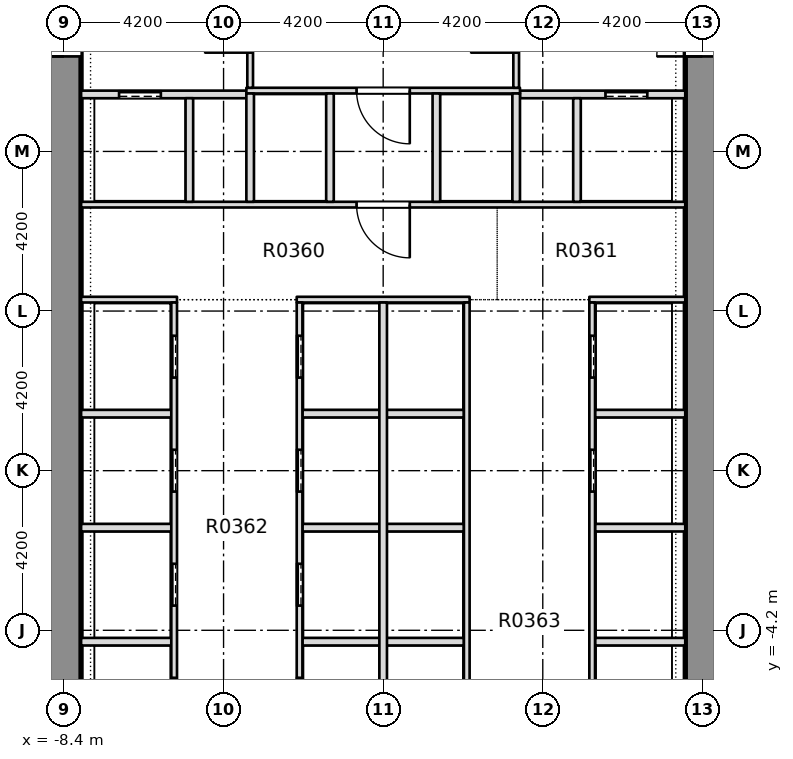
"""IFC4 building model, lengths in metres.
Left out: names, types, materials, properties, quantities, classifications, styles, units other than length and angle.
Written with IfcOpenShell. Run it as: python <this file> out.ifc"""

import sys

from ifc_helpers import new_model, si_unit, direction, frame, frame_2d, origin, place, context, subcontext, project, spatial, rectangle, extrude, element, fill, save


model = new_model("IFC4")
c1 = context("Model", 3, precision=1e-05, world=origin(), true_north=direction((0.0, 1.0)))
c2 = subcontext(c1, "Body", "Model", "MODEL_VIEW")
j1 = project(units=[si_unit("LENGTHUNIT", "METRE"), si_unit("PLANEANGLEUNIT", "RADIAN")], contexts=[c1])
p1 = place(None, origin())
s1 = spatial("IfcSite", under=j1, at=p1, CompositionType="ELEMENT")
p2 = place(p1, origin())
s2 = spatial("IfcBuilding", under=s1, at=p2, CompositionType="ELEMENT")
p3 = place(p2, frame((0.0, 0.0, 20.0)))
s3 = spatial("IfcBuildingStorey", under=s2, at=p3, CompositionType="ELEMENT", Elevation=20.0)
p4 = place(p3, frame((-8.4, -7.5, -0.4), z_axis=(0.0, 0.0, 1.0), x_axis=(0.0, 1.0, 0.0)))
e1 = element("IfcWall", 1, at=p4, inside=s3, PredefinedType="SHEAR", context=c2, shape_type="SweptSolid", body=[
    extrude(rectangle(XDim=28.35, YDim=0.9, at=frame_2d((14.175, 0.0))), origin(), (0.0, 0.0, 1.0), 5.0),
])
p5 = place(p4, frame((18.4, 0.0, 0.4)))
e2 = element("IfcOpeningElement", 2, at=p5, cuts=e1, PredefinedType="OPENING", context=c2, shape_type="SweptSolid", body=[
    extrude(rectangle(XDim=1.2, YDim=2.1, at=frame_2d((0.6, 1.05))), frame((0.0, 0.46, 0.0), z_axis=(0.0, -1.0, 0.0), x_axis=(1.0, 0.0, 0.0)), (0.0, 0.0, 1.0), 0.92),
])
p6 = place(p3, frame((8.4, -7.5, -0.4), z_axis=(0.0, 0.0, 1.0), x_axis=(0.0, 1.0, 0.0)))
e3 = element("IfcWall", 3, at=p6, inside=s3, PredefinedType="SHEAR", context=c2, shape_type="SweptSolid", body=[
    extrude(rectangle(XDim=28.35, YDim=0.9, at=frame_2d((14.175, 0.0))), origin(), (0.0, 0.0, 1.0), 5.0),
])
p7 = place(p6, frame((18.4, 0.0, 0.4)))
e4 = element("IfcOpeningElement", 4, at=p7, cuts=e3, PredefinedType="OPENING", context=c2, shape_type="SweptSolid", body=[
    extrude(rectangle(XDim=1.2, YDim=2.1, at=frame_2d((0.6, 1.05))), frame((0.0, 0.46, 0.0), z_axis=(0.0, -1.0, 0.0), x_axis=(1.0, 0.0, 0.0)), (0.0, 0.0, 1.0), 0.92),
])
p8 = place(p3, frame((-7.949, -4.5, 0.0), z_axis=(0.0, 0.0, 1.0), x_axis=(1.0, 0.0, 0.0)))
e5 = element("IfcWall", 5, at=p8, inside=s3, PredefinedType="PARTITIONING", context=c2, shape_type="SweptSolid", body=[
    extrude(rectangle(XDim=2.374, YDim=0.2, at=frame_2d((1.187, 0.0))), origin(), (0.0, 0.0, 1.0), 4.6),
])
p9 = place(p3, frame((-2.125, -4.5, 0.0), z_axis=(0.0, 0.0, 1.0), x_axis=(1.0, 0.0, 0.0)))
e6 = element("IfcWall", 6, at=p9, inside=s3, PredefinedType="PARTITIONING", context=c2, shape_type="SweptSolid", body=[
    extrude(rectangle(XDim=4.25, YDim=0.2, at=frame_2d((2.125, 0.0))), origin(), (0.0, 0.0, 1.0), 4.6),
])
for number, where, z_axis, x_axis in (
    (7, (5.575, -4.5, 0.0), (0.0, 0.0, 1.0), (1.0, 0.0, 0.0)),
    (8, (-7.949, -1.5, 0.0), (0.0, 0.0, 1.0), (1.0, 0.0, 0.0)),
):
    element("IfcWall", number, at=place(p3, frame(where, z_axis=z_axis, x_axis=x_axis)), inside=s3, PredefinedType="PARTITIONING", context=c2, shape_type="SweptSolid", body=[
        extrude(rectangle(XDim=2.374, YDim=0.2, at=frame_2d((1.187, 0.0))), origin(), (0.0, 0.0, 1.0), 4.6),
    ])
p10 = place(p3, frame((-2.125, -1.5, 0.0), z_axis=(0.0, 0.0, 1.0), x_axis=(1.0, 0.0, 0.0)))
e9 = element("IfcWall", 9, at=p10, inside=s3, PredefinedType="PARTITIONING", context=c2, shape_type="SweptSolid", body=[
    extrude(rectangle(XDim=4.25, YDim=0.2, at=frame_2d((2.125, 0.0))), origin(), (0.0, 0.0, 1.0), 4.6),
])
for number, where, z_axis, x_axis in (
    (10, (5.575, -1.5, 0.0), (0.0, 0.0, 1.0), (1.0, 0.0, 0.0)),
    (11, (-7.949, 1.5, 0.0), (0.0, 0.0, 1.0), (1.0, 0.0, 0.0)),
):
    element("IfcWall", number, at=place(p3, frame(where, z_axis=z_axis, x_axis=x_axis)), inside=s3, PredefinedType="PARTITIONING", context=c2, shape_type="SweptSolid", body=[
        extrude(rectangle(XDim=2.374, YDim=0.2, at=frame_2d((1.187, 0.0))), origin(), (0.0, 0.0, 1.0), 4.6),
    ])
p11 = place(p3, frame((-2.125, 1.5, 0.0), z_axis=(0.0, 0.0, 1.0), x_axis=(1.0, 0.0, 0.0)))
e12 = element("IfcWall", 12, at=p11, inside=s3, PredefinedType="PARTITIONING", context=c2, shape_type="SweptSolid", body=[
    extrude(rectangle(XDim=4.25, YDim=0.2, at=frame_2d((2.125, 0.0))), origin(), (0.0, 0.0, 1.0), 4.6),
])
p12 = place(p3, frame((5.575, 1.5, 0.0), z_axis=(0.0, 0.0, 1.0), x_axis=(1.0, 0.0, 0.0)))
e13 = element("IfcWall", 13, at=p12, inside=s3, PredefinedType="PARTITIONING", context=c2, shape_type="SweptSolid", body=[
    extrude(rectangle(XDim=2.374, YDim=0.2, at=frame_2d((1.187, 0.0))), origin(), (0.0, 0.0, 1.0), 4.6),
])
p13 = place(p3, frame((-7.949, 4.5, 0.0), z_axis=(0.0, 0.0, 1.0), x_axis=(1.0, 0.0, 0.0)))
e14 = element("IfcWall", 14, at=p13, inside=s3, PredefinedType="PARTITIONING", context=c2, shape_type="SweptSolid", body=[
    extrude(rectangle(XDim=2.524, YDim=0.15, at=frame_2d((1.262, 0.0))), origin(), (0.0, 0.0, 1.0), 4.6),
])
p14 = place(p3, frame((-2.275, 4.5, 0.0), z_axis=(0.0, 0.0, 1.0), x_axis=(1.0, 0.0, 0.0)))
e15 = element("IfcWall", 15, at=p14, inside=s3, PredefinedType="PARTITIONING", context=c2, shape_type="SweptSolid", body=[
    extrude(rectangle(XDim=4.55, YDim=0.15, at=frame_2d((2.275, 0.0))), origin(), (0.0, 0.0, 1.0), 4.6),
])
p15 = place(p3, frame((5.425, 4.5, 0.0), z_axis=(0.0, 0.0, 1.0), x_axis=(1.0, 0.0, 0.0)))
e16 = element("IfcWall", 16, at=p15, inside=s3, PredefinedType="PARTITIONING", context=c2, shape_type="SweptSolid", body=[
    extrude(rectangle(XDim=2.524, YDim=0.15, at=frame_2d((1.262, 0.0))), origin(), (0.0, 0.0, 1.0), 4.6),
])
p16 = place(p3, frame((-7.949, 7.0, 0.0), z_axis=(0.0, 0.0, 1.0), x_axis=(1.0, 0.0, 0.0)))
e17 = element("IfcWall", 17, at=p16, inside=s3, PredefinedType="PARTITIONING", context=c2, shape_type="SweptSolid", body=[
    extrude(rectangle(XDim=15.898, YDim=0.15, at=frame_2d((7.949, 0.0))), origin(), (0.0, 0.0, 1.0), 4.6),
])
p17 = place(p16, frame((7.249, 0.0, 0.0)))
e18 = element("IfcOpeningElement", 18, at=p17, cuts=e17, PredefinedType="OPENING", context=c2, shape_type="SweptSolid", body=[
    extrude(rectangle(XDim=1.4, YDim=2.1, at=frame_2d((0.7, 1.05))), frame((0.0, 0.085, 0.0), z_axis=(0.0, -1.0, 0.0), x_axis=(1.0, 0.0, 0.0)), (0.0, 0.0, 1.0), 0.17),
])
p18 = place(p3, frame((-7.949, 9.9, 0.0), z_axis=(0.0, 0.0, 1.0), x_axis=(1.0, 0.0, 0.0)))
e19 = element("IfcWall", 19, at=p18, inside=s3, PredefinedType="PARTITIONING", context=c2, shape_type="SweptSolid", body=[
    extrude(rectangle(XDim=4.349, YDim=0.2, at=frame_2d((2.174, 0.0))), origin(), (0.0, 0.0, 1.0), 4.6),
])
p19 = place(p18, frame((0.999, 0.0, 0.0)))
e20 = element("IfcOpeningElement", 20, at=p19, cuts=e19, PredefinedType="OPENING", context=c2, shape_type="SweptSolid", body=[
    extrude(rectangle(XDim=1.1, YDim=2.1, at=frame_2d((0.55, 1.05))), frame((0.0, 0.11, 0.0), z_axis=(0.0, -1.0, 0.0), x_axis=(1.0, 0.0, 0.0)), (0.0, 0.0, 1.0), 0.22),
])
p20 = place(p3, frame((3.6, 9.9, 0.0), z_axis=(0.0, 0.0, 1.0), x_axis=(1.0, 0.0, 0.0)))
e21 = element("IfcWall", 21, at=p20, inside=s3, PredefinedType="PARTITIONING", context=c2, shape_type="SweptSolid", body=[
    extrude(rectangle(XDim=4.349, YDim=0.2, at=frame_2d((2.174, 0.0))), origin(), (0.0, 0.0, 1.0), 4.6),
])
p21 = place(p20, frame((2.25, 0.0, 0.0)))
e22 = element("IfcOpeningElement", 22, at=p21, cuts=e21, PredefinedType="OPENING", context=c2, shape_type="SweptSolid", body=[
    extrude(rectangle(XDim=1.1, YDim=2.1, at=frame_2d((0.55, 1.05))), frame((0.0, 0.11, 0.0), z_axis=(0.0, -1.0, 0.0), x_axis=(1.0, 0.0, 0.0)), (0.0, 0.0, 1.0), 0.22),
])
p22 = place(p3, frame((-3.6, 10.0, 0.0), z_axis=(0.0, 0.0, 1.0), x_axis=(1.0, 0.0, 0.0)))
e23 = element("IfcWall", 23, at=p22, inside=s3, PredefinedType="PARTITIONING", context=c2, shape_type="SweptSolid", body=[
    extrude(rectangle(XDim=7.2, YDim=0.15, at=frame_2d((3.6, 0.0))), origin(), (0.0, 0.0, 1.0), 4.6),
])
p23 = place(p22, frame((2.9, 0.0, 0.0)))
e24 = element("IfcOpeningElement", 24, at=p23, cuts=e23, PredefinedType="OPENING", context=c2, shape_type="SweptSolid", body=[
    extrude(rectangle(XDim=1.4, YDim=2.1, at=frame_2d((0.7, 1.05))), frame((0.0, 0.085, 0.0), z_axis=(0.0, -1.0, 0.0), x_axis=(1.0, 0.0, 0.0)), (0.0, 0.0, 1.0), 0.17),
])
p24 = place(p3, frame((-5.5, -7.499, 0.0), z_axis=(0.0, 0.0, 1.0), x_axis=(0.0, 1.0, 0.0)))
e25 = element("IfcWall", 25, at=p24, inside=s3, PredefinedType="PARTITIONING", context=c2, shape_type="SweptSolid", body=[
    extrude(rectangle(XDim=11.924, YDim=0.15, at=frame_2d((5.962, 0.0))), origin(), (0.0, 0.0, 1.0), 4.6),
])
p25 = place(p24, frame((0.949, 0.0, 0.0)))
e26 = element("IfcOpeningElement", 26, at=p25, cuts=e25, PredefinedType="OPENING", context=c2, shape_type="SweptSolid", body=[
    extrude(rectangle(XDim=1.1, YDim=2.1, at=frame_2d((0.55, 1.05))), frame((0.0, 0.085, 0.0), z_axis=(0.0, -1.0, 0.0), x_axis=(1.0, 0.0, 0.0)), (0.0, 0.0, 1.0), 0.17),
])
p26 = place(p24, frame((3.949, 0.0, 0.0)))
e27 = element("IfcOpeningElement", 27, at=p26, cuts=e25, PredefinedType="OPENING", context=c2, shape_type="SweptSolid", body=[
    extrude(rectangle(XDim=1.1, YDim=2.1, at=frame_2d((0.55, 1.05))), frame((0.0, 0.085, 0.0), z_axis=(0.0, -1.0, 0.0), x_axis=(1.0, 0.0, 0.0)), (0.0, 0.0, 1.0), 0.17),
])
p27 = place(p24, frame((6.949, 0.0, 0.0)))
e28 = element("IfcOpeningElement", 28, at=p27, cuts=e25, PredefinedType="OPENING", context=c2, shape_type="SweptSolid", body=[
    extrude(rectangle(XDim=1.1, YDim=2.1, at=frame_2d((0.55, 1.05))), frame((0.0, 0.085, 0.0), z_axis=(0.0, -1.0, 0.0), x_axis=(1.0, 0.0, 0.0)), (0.0, 0.0, 1.0), 0.17),
])
p28 = place(p24, frame((9.949, 0.0, 0.0)))
e29 = element("IfcOpeningElement", 29, at=p28, cuts=e25, PredefinedType="OPENING", context=c2, shape_type="SweptSolid", body=[
    extrude(rectangle(XDim=1.1, YDim=2.1, at=frame_2d((0.55, 1.05))), frame((0.0, 0.085, 0.0), z_axis=(0.0, -1.0, 0.0), x_axis=(1.0, 0.0, 0.0)), (0.0, 0.0, 1.0), 0.17),
])
p29 = place(p3, frame((-5.1, 7.075, 0.0), z_axis=(0.0, 0.0, 1.0), x_axis=(0.0, 1.0, 0.0)))
e30 = element("IfcWall", 30, at=p29, inside=s3, PredefinedType="PARTITIONING", context=c2, shape_type="SweptSolid", body=[
    extrude(rectangle(XDim=2.725, YDim=0.2, at=frame_2d((1.363, 0.0))), origin(), (0.0, 0.0, 1.0), 4.6),
])
p30 = place(p3, frame((-3.5, 7.075, 0.0), z_axis=(0.0, 0.0, 1.0), x_axis=(0.0, 1.0, 0.0)))
e31 = element("IfcWall", 31, at=p30, inside=s3, PredefinedType="PARTITIONING", context=c2, shape_type="SweptSolid", body=[
    extrude(rectangle(XDim=2.85, YDim=0.2, at=frame_2d((1.425, 0.0))), origin(), (0.0, 0.0, 1.0), 4.6),
])
p31 = place(p3, frame((-3.5, 10.075, 0.0), z_axis=(0.0, 0.0, 1.0), x_axis=(0.0, 1.0, 0.0)))
e32 = element("IfcWall", 32, at=p31, inside=s3, PredefinedType="PARTITIONING", context=c2, shape_type="SweptSolid", body=[
    extrude(rectangle(XDim=3.075, YDim=0.15, at=frame_2d((1.538, 0.0))), origin(), (0.0, 0.0, 1.0), 4.6),
])
p32 = place(p31, frame((0.925, 0.0, 0.0)))
e33 = element("IfcOpeningElement", 33, at=p32, cuts=e32, PredefinedType="OPENING", context=c2, shape_type="SweptSolid", body=[
    extrude(rectangle(XDim=1.2, YDim=2.1, at=frame_2d((0.6, 1.05))), frame((0.0, 0.085, 0.0), z_axis=(0.0, -1.0, 0.0), x_axis=(1.0, 0.0, 0.0)), (0.0, 0.0, 1.0), 0.17),
])
p33 = place(p3, frame((-2.2, -7.499, 0.0), z_axis=(0.0, 0.0, 1.0), x_axis=(0.0, 1.0, 0.0)))
e34 = element("IfcWall", 34, at=p33, inside=s3, PredefinedType="PARTITIONING", context=c2, shape_type="SweptSolid", body=[
    extrude(rectangle(XDim=11.924, YDim=0.15, at=frame_2d((5.962, 0.0))), origin(), (0.0, 0.0, 1.0), 4.6),
])
p34 = place(p33, frame((0.949, 0.0, 0.0)))
e35 = element("IfcOpeningElement", 35, at=p34, cuts=e34, PredefinedType="OPENING", context=c2, shape_type="SweptSolid", body=[
    extrude(rectangle(XDim=1.1, YDim=2.1, at=frame_2d((0.55, 1.05))), frame((0.0, 0.085, 0.0), z_axis=(0.0, -1.0, 0.0), x_axis=(1.0, 0.0, 0.0)), (0.0, 0.0, 1.0), 0.17),
])
p35 = place(p33, frame((3.949, 0.0, 0.0)))
e36 = element("IfcOpeningElement", 36, at=p35, cuts=e34, PredefinedType="OPENING", context=c2, shape_type="SweptSolid", body=[
    extrude(rectangle(XDim=1.1, YDim=2.1, at=frame_2d((0.55, 1.05))), frame((0.0, 0.085, 0.0), z_axis=(0.0, -1.0, 0.0), x_axis=(1.0, 0.0, 0.0)), (0.0, 0.0, 1.0), 0.17),
])
p36 = place(p33, frame((6.949, 0.0, 0.0)))
e37 = element("IfcOpeningElement", 37, at=p36, cuts=e34, PredefinedType="OPENING", context=c2, shape_type="SweptSolid", body=[
    extrude(rectangle(XDim=1.1, YDim=2.1, at=frame_2d((0.55, 1.05))), frame((0.0, 0.085, 0.0), z_axis=(0.0, -1.0, 0.0), x_axis=(1.0, 0.0, 0.0)), (0.0, 0.0, 1.0), 0.17),
])
p37 = place(p33, frame((9.949, 0.0, 0.0)))
e38 = element("IfcOpeningElement", 38, at=p37, cuts=e34, PredefinedType="OPENING", context=c2, shape_type="SweptSolid", body=[
    extrude(rectangle(XDim=1.1, YDim=2.1, at=frame_2d((0.55, 1.05))), frame((0.0, 0.085, 0.0), z_axis=(0.0, -1.0, 0.0), x_axis=(1.0, 0.0, 0.0)), (0.0, 0.0, 1.0), 0.17),
])
p38 = place(p3, frame((-1.4, 7.075, 0.0), z_axis=(0.0, 0.0, 1.0), x_axis=(0.0, 1.0, 0.0)))
e39 = element("IfcWall", 39, at=p38, inside=s3, PredefinedType="PARTITIONING", context=c2, shape_type="SweptSolid", body=[
    extrude(rectangle(XDim=2.85, YDim=0.2, at=frame_2d((1.425, 0.0))), origin(), (0.0, 0.0, 1.0), 4.6),
])
p39 = place(p3, frame((0.0, -7.499, 0.0), z_axis=(0.0, 0.0, 1.0), x_axis=(0.0, 1.0, 0.0)))
e40 = element("IfcWall", 40, at=p39, inside=s3, PredefinedType="PARTITIONING", context=c2, shape_type="SweptSolid", body=[
    extrude(rectangle(XDim=11.924, YDim=0.2, at=frame_2d((5.962, 0.0))), origin(), (0.0, 0.0, 1.0), 4.6),
])
p40 = place(p3, frame((1.4, 7.075, 0.0), z_axis=(0.0, 0.0, 1.0), x_axis=(0.0, 1.0, 0.0)))
e41 = element("IfcWall", 41, at=p40, inside=s3, PredefinedType="PARTITIONING", context=c2, shape_type="SweptSolid", body=[
    extrude(rectangle(XDim=2.85, YDim=0.2, at=frame_2d((1.425, 0.0))), origin(), (0.0, 0.0, 1.0), 4.6),
])
p41 = place(p3, frame((2.2, -7.499, 0.0), z_axis=(0.0, 0.0, 1.0), x_axis=(0.0, 1.0, 0.0)))
e42 = element("IfcWall", 42, at=p41, inside=s3, PredefinedType="PARTITIONING", context=c2, shape_type="SweptSolid", body=[
    extrude(rectangle(XDim=11.924, YDim=0.15, at=frame_2d((5.962, 0.0))), origin(), (0.0, 0.0, 1.0), 4.6),
])
p42 = place(p3, frame((3.5, 7.075, 0.0), z_axis=(0.0, 0.0, 1.0), x_axis=(0.0, 1.0, 0.0)))
e43 = element("IfcWall", 43, at=p42, inside=s3, PredefinedType="PARTITIONING", context=c2, shape_type="SweptSolid", body=[
    extrude(rectangle(XDim=2.85, YDim=0.2, at=frame_2d((1.425, 0.0))), origin(), (0.0, 0.0, 1.0), 4.6),
])
p43 = place(p3, frame((3.5, 10.075, 0.0), z_axis=(0.0, 0.0, 1.0), x_axis=(0.0, 1.0, 0.0)))
e44 = element("IfcWall", 44, at=p43, inside=s3, PredefinedType="PARTITIONING", context=c2, shape_type="SweptSolid", body=[
    extrude(rectangle(XDim=3.075, YDim=0.15, at=frame_2d((1.538, 0.0))), origin(), (0.0, 0.0, 1.0), 4.6),
])
p44 = place(p43, frame((0.925, 0.0, 0.0)))
e45 = element("IfcOpeningElement", 45, at=p44, cuts=e44, PredefinedType="OPENING", context=c2, shape_type="SweptSolid", body=[
    extrude(rectangle(XDim=1.2, YDim=2.1, at=frame_2d((0.6, 1.05))), frame((0.0, 0.085, 0.0), z_axis=(0.0, -1.0, 0.0), x_axis=(1.0, 0.0, 0.0)), (0.0, 0.0, 1.0), 0.17),
])
p45 = place(p3, frame((5.1, 7.075, 0.0), z_axis=(0.0, 0.0, 1.0), x_axis=(0.0, 1.0, 0.0)))
e46 = element("IfcWall", 46, at=p45, inside=s3, PredefinedType="PARTITIONING", context=c2, shape_type="SweptSolid", body=[
    extrude(rectangle(XDim=2.725, YDim=0.2, at=frame_2d((1.363, 0.0))), origin(), (0.0, 0.0, 1.0), 4.6),
])
p46 = place(p3, frame((5.5, -7.499, 0.0), z_axis=(0.0, 0.0, 1.0), x_axis=(0.0, 1.0, 0.0)))
e47 = element("IfcWall", 47, at=p46, inside=s3, PredefinedType="PARTITIONING", context=c2, shape_type="SweptSolid", body=[
    extrude(rectangle(XDim=11.924, YDim=0.15, at=frame_2d((5.962, 0.0))), origin(), (0.0, 0.0, 1.0), 4.6),
])
p47 = place(p46, frame((6.949, 0.0, 0.0)))
e48 = element("IfcOpeningElement", 48, at=p47, cuts=e47, PredefinedType="OPENING", context=c2, shape_type="SweptSolid", body=[
    extrude(rectangle(XDim=1.1, YDim=2.1, at=frame_2d((0.55, 1.05))), frame((0.0, 0.085, 0.0), z_axis=(0.0, -1.0, 0.0), x_axis=(1.0, 0.0, 0.0)), (0.0, 0.0, 1.0), 0.17),
])
p48 = place(p46, frame((9.949, 0.0, 0.0)))
e49 = element("IfcOpeningElement", 49, at=p48, cuts=e47, PredefinedType="OPENING", context=c2, shape_type="SweptSolid", body=[
    extrude(rectangle(XDim=1.1, YDim=2.1, at=frame_2d((0.55, 1.05))), frame((0.0, 0.085, 0.0), z_axis=(0.0, -1.0, 0.0), x_axis=(1.0, 0.0, 0.0)), (0.0, 0.0, 1.0), 0.17),
])
p49 = place(p25, origin())
e50 = element("IfcDoor", 50, at=p49, inside=s3, OperationType="SLIDING_TO_RIGHT", PredefinedType="DOOR", context=c2, shape_type="SweptSolid", body=[
    extrude(rectangle(XDim=1.1, YDim=2.1, at=frame_2d((0.55, 1.05))), frame((0.0, 0.025, 0.0), z_axis=(0.0, -1.0, 0.0), x_axis=(1.0, 0.0, 0.0)), (0.0, 0.0, 1.0), 0.05),
])
fill(e26, e50)
p50 = place(p26, origin())
e51 = element("IfcDoor", 51, at=p50, inside=s3, OperationType="SLIDING_TO_RIGHT", PredefinedType="DOOR", context=c2, shape_type="SweptSolid", body=[
    extrude(rectangle(XDim=1.1, YDim=2.1, at=frame_2d((0.55, 1.05))), frame((0.0, 0.025, 0.0), z_axis=(0.0, -1.0, 0.0), x_axis=(1.0, 0.0, 0.0)), (0.0, 0.0, 1.0), 0.05),
])
fill(e27, e51)
p51 = place(p27, origin())
e52 = element("IfcDoor", 52, at=p51, inside=s3, OperationType="SLIDING_TO_RIGHT", PredefinedType="DOOR", context=c2, shape_type="SweptSolid", body=[
    extrude(rectangle(XDim=1.1, YDim=2.1, at=frame_2d((0.55, 1.05))), frame((0.0, 0.025, 0.0), z_axis=(0.0, -1.0, 0.0), x_axis=(1.0, 0.0, 0.0)), (0.0, 0.0, 1.0), 0.05),
])
fill(e28, e52)
p52 = place(p28, origin())
e53 = element("IfcDoor", 53, at=p52, inside=s3, OperationType="SLIDING_TO_RIGHT", PredefinedType="DOOR", context=c2, shape_type="SweptSolid", body=[
    extrude(rectangle(XDim=1.1, YDim=2.1, at=frame_2d((0.55, 1.05))), frame((0.0, 0.025, 0.0), z_axis=(0.0, -1.0, 0.0), x_axis=(1.0, 0.0, 0.0)), (0.0, 0.0, 1.0), 0.05),
])
fill(e29, e53)
p53 = place(p34, origin())
e54 = element("IfcDoor", 54, at=p53, inside=s3, OperationType="SLIDING_TO_RIGHT", PredefinedType="DOOR", context=c2, shape_type="SweptSolid", body=[
    extrude(rectangle(XDim=1.1, YDim=2.1, at=frame_2d((0.55, 1.05))), frame((0.0, 0.025, 0.0), z_axis=(0.0, -1.0, 0.0), x_axis=(1.0, 0.0, 0.0)), (0.0, 0.0, 1.0), 0.05),
])
fill(e35, e54)
p54 = place(p35, origin())
e55 = element("IfcDoor", 55, at=p54, inside=s3, OperationType="SLIDING_TO_RIGHT", PredefinedType="DOOR", context=c2, shape_type="SweptSolid", body=[
    extrude(rectangle(XDim=1.1, YDim=2.1, at=frame_2d((0.55, 1.05))), frame((0.0, 0.025, 0.0), z_axis=(0.0, -1.0, 0.0), x_axis=(1.0, 0.0, 0.0)), (0.0, 0.0, 1.0), 0.05),
])
fill(e36, e55)
p55 = place(p36, origin())
e56 = element("IfcDoor", 56, at=p55, inside=s3, OperationType="SLIDING_TO_RIGHT", PredefinedType="DOOR", context=c2, shape_type="SweptSolid", body=[
    extrude(rectangle(XDim=1.1, YDim=2.1, at=frame_2d((0.55, 1.05))), frame((0.0, 0.025, 0.0), z_axis=(0.0, -1.0, 0.0), x_axis=(1.0, 0.0, 0.0)), (0.0, 0.0, 1.0), 0.05),
])
fill(e37, e56)
p56 = place(p37, origin())
e57 = element("IfcDoor", 57, at=p56, inside=s3, OperationType="SLIDING_TO_RIGHT", PredefinedType="DOOR", context=c2, shape_type="SweptSolid", body=[
    extrude(rectangle(XDim=1.1, YDim=2.1, at=frame_2d((0.55, 1.05))), frame((0.0, 0.025, 0.0), z_axis=(0.0, -1.0, 0.0), x_axis=(1.0, 0.0, 0.0)), (0.0, 0.0, 1.0), 0.05),
])
fill(e38, e57)
p57 = place(p47, origin())
e58 = element("IfcDoor", 58, at=p57, inside=s3, OperationType="SLIDING_TO_RIGHT", PredefinedType="DOOR", context=c2, shape_type="SweptSolid", body=[
    extrude(rectangle(XDim=1.1, YDim=2.1, at=frame_2d((0.55, 1.05))), frame((0.0, 0.025, 0.0), z_axis=(0.0, -1.0, 0.0), x_axis=(1.0, 0.0, 0.0)), (0.0, 0.0, 1.0), 0.05),
])
fill(e48, e58)
p58 = place(p48, origin())
e59 = element("IfcDoor", 59, at=p58, inside=s3, OperationType="SLIDING_TO_RIGHT", PredefinedType="DOOR", context=c2, shape_type="SweptSolid", body=[
    extrude(rectangle(XDim=1.1, YDim=2.1, at=frame_2d((0.55, 1.05))), frame((0.0, 0.025, 0.0), z_axis=(0.0, -1.0, 0.0), x_axis=(1.0, 0.0, 0.0)), (0.0, 0.0, 1.0), 0.05),
])
fill(e49, e59)
p59 = place(p19, origin())
e60 = element("IfcDoor", 60, at=p59, inside=s3, OperationType="SLIDING_TO_RIGHT", PredefinedType="DOOR", context=c2, shape_type="SweptSolid", body=[
    extrude(rectangle(XDim=1.1, YDim=2.1, at=frame_2d((0.55, 1.05))), frame((0.0, 0.025, 0.0), z_axis=(0.0, -1.0, 0.0), x_axis=(1.0, 0.0, 0.0)), (0.0, 0.0, 1.0), 0.05),
])
fill(e20, e60)
p60 = place(p21, origin())
e61 = element("IfcDoor", 61, at=p60, inside=s3, OperationType="SLIDING_TO_LEFT", PredefinedType="DOOR", context=c2, shape_type="SweptSolid", body=[
    extrude(rectangle(XDim=1.1, YDim=2.1, at=frame_2d((0.55, 1.05))), frame((0.0, 0.025, 0.0), z_axis=(0.0, -1.0, 0.0), x_axis=(1.0, 0.0, 0.0)), (0.0, 0.0, 1.0), 0.05),
])
fill(e22, e61)
p61 = place(p17, origin())
e62 = element("IfcDoor", 62, at=p61, inside=s3, OperationType="SINGLE_SWING_RIGHT", PredefinedType="DOOR", context=c2, shape_type="SweptSolid", body=[
    extrude(rectangle(XDim=1.4, YDim=2.1, at=frame_2d((0.7, 1.05))), frame((0.0, 0.025, 0.0), z_axis=(0.0, -1.0, 0.0), x_axis=(1.0, 0.0, 0.0)), (0.0, 0.0, 1.0), 0.05),
])
fill(e18, e62)
p62 = place(p23, origin())
e63 = element("IfcDoor", 63, at=p62, inside=s3, OperationType="SINGLE_SWING_RIGHT", PredefinedType="DOOR", context=c2, shape_type="SweptSolid", body=[
    extrude(rectangle(XDim=1.4, YDim=2.1, at=frame_2d((0.7, 1.05))), frame((0.0, 0.025, 0.0), z_axis=(0.0, -1.0, 0.0), x_axis=(1.0, 0.0, 0.0)), (0.0, 0.0, 1.0), 0.05),
])
fill(e24, e63)
p63 = place(p5, origin())
e64 = element("IfcDoor", 64, at=p63, inside=s3, OperationType="SINGLE_SWING_LEFT", PredefinedType="DOOR", context=c2, shape_type="SweptSolid", body=[
    extrude(rectangle(XDim=1.2, YDim=2.1, at=frame_2d((0.6, 1.05))), frame((0.0, 0.025, 0.0), z_axis=(0.0, -1.0, 0.0), x_axis=(1.0, 0.0, 0.0)), (0.0, 0.0, 1.0), 0.05),
])
fill(e2, e64)
p64 = place(p7, origin())
e65 = element("IfcDoor", 65, at=p64, inside=s3, OperationType="SINGLE_SWING_LEFT", PredefinedType="DOOR", context=c2, shape_type="SweptSolid", body=[
    extrude(rectangle(XDim=1.2, YDim=2.1, at=frame_2d((0.6, 1.05))), frame((0.0, 0.025, 0.0), z_axis=(0.0, -1.0, 0.0), x_axis=(1.0, 0.0, 0.0)), (0.0, 0.0, 1.0), 0.05),
])
fill(e4, e65)
save(model, sys.argv[1])
